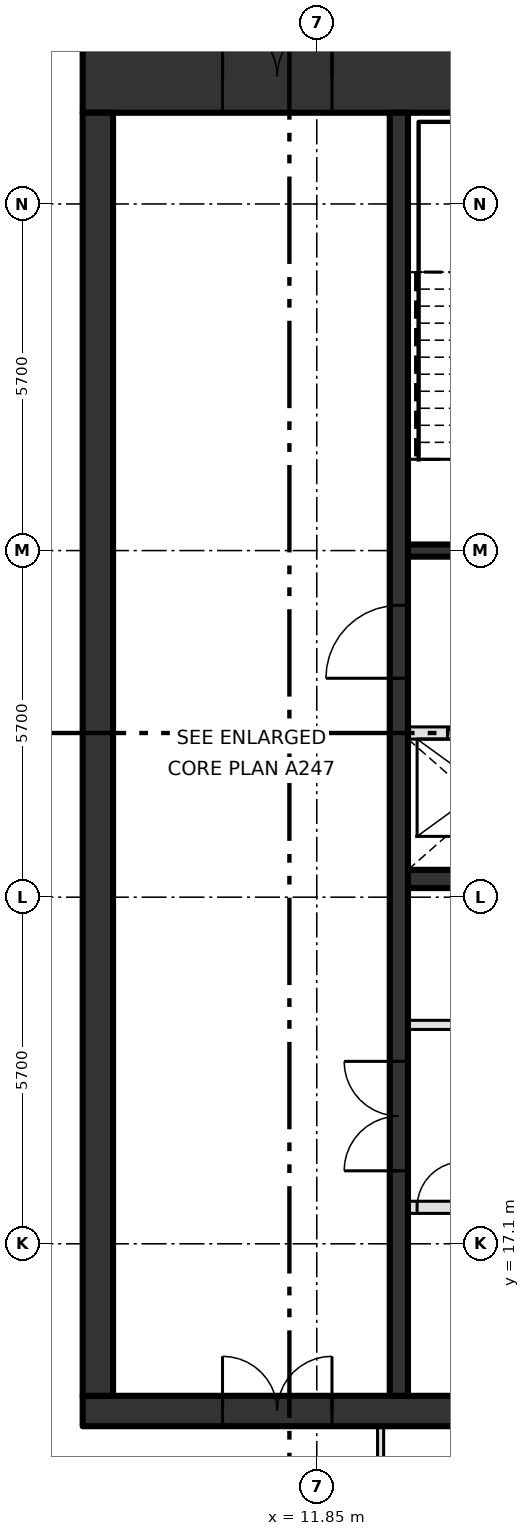
"""IFC4 building model, lengths in metres.
Left out: names, types, materials, properties, quantities, classifications, styles, units other than length and angle.
Written with IfcOpenShell. Run it as: python <this file> out.ifc"""

import sys

from ifc_helpers import new_model, si_unit, direction, frame, frame_2d, origin, place, context, subcontext, project, spatial, rectangle, extrude, element, fill, save


model = new_model("IFC4")
c1 = context("Model", 3, precision=1e-05, world=origin(), true_north=direction((0.0, 1.0)))
c2 = subcontext(c1, "Body", "Model", "MODEL_VIEW")
j1 = project(units=[si_unit("LENGTHUNIT", "METRE"), si_unit("PLANEANGLEUNIT", "RADIAN")], contexts=[c1])
p1 = place(None, origin())
s1 = spatial("IfcSite", under=j1, at=p1, CompositionType="ELEMENT")
p2 = place(p1, origin())
s2 = spatial("IfcBuilding", under=s1, at=p2, CompositionType="ELEMENT")
p3 = place(p2, frame((0.0, 0.0, 354.0)))
s3 = spatial("IfcBuildingStorey", under=s2, at=p3, CompositionType="ELEMENT", Elevation=354.0)
p4 = place(p3, frame((8.0, 14.35, -0.3), z_axis=(0.0, 0.0, 1.0), x_axis=(1.0, 0.0, 0.0)))
e1 = element("IfcWall", 1, at=p4, inside=s3, PredefinedType="SHEAR", context=c2, shape_type="SweptSolid", body=[
    extrude(rectangle(XDim=22.8, YDim=0.5, at=frame_2d((11.4, 0.0))), origin(), (0.0, 0.0, 1.0), 4.2),
])
p5 = place(p4, frame((2.3, 0.0, 0.3)))
e2 = element("IfcOpeningElement", 2, at=p5, cuts=e1, PredefinedType="OPENING", context=c2, shape_type="SweptSolid", body=[
    extrude(rectangle(XDim=1.8, YDim=2.1, at=frame_2d((0.9, 1.05))), frame((0.0, 0.26, 0.0), z_axis=(0.0, -1.0, 0.0), x_axis=(1.0, 0.0, 0.0)), (0.0, 0.0, 1.0), 0.52),
])
p6 = place(p3, frame((8.0, 36.3, -0.3), z_axis=(0.0, 0.0, 1.0), x_axis=(1.0, 0.0, 0.0)))
e3 = element("IfcWall", 3, at=p6, inside=s3, PredefinedType="SHEAR", context=c2, shape_type="SweptSolid", body=[
    extrude(rectangle(XDim=22.8, YDim=1.2, at=frame_2d((11.4, 0.0))), origin(), (0.0, 0.0, 1.0), 4.2),
])
p7 = place(p6, frame((2.3, 0.0, 0.3)))
e4 = element("IfcOpeningElement", 4, at=p7, cuts=e3, PredefinedType="OPENING", context=c2, shape_type="SweptSolid", body=[
    extrude(rectangle(XDim=1.8, YDim=2.1, at=frame_2d((0.9, 1.05))), frame((0.0, 0.61, 0.0), z_axis=(0.0, -1.0, 0.0), x_axis=(1.0, 0.0, 0.0)), (0.0, 0.0, 1.0), 1.22),
])
p8 = place(p3, frame((8.25, 14.6, -0.3), z_axis=(0.0, 0.0, 1.0), x_axis=(0.0, 1.0, 0.0)))
e5 = element("IfcWall", 5, at=p8, inside=s3, PredefinedType="SHEAR", context=c2, shape_type="SweptSolid", body=[
    extrude(rectangle(XDim=21.1, YDim=0.5, at=frame_2d((10.55, 0.0))), origin(), (0.0, 0.0, 1.0), 4.2),
])
p9 = place(p3, frame((13.35, 17.7, 0.0), z_axis=(0.0, 0.0, 1.0), x_axis=(1.0, 0.0, 0.0)))
e6 = element("IfcWall", 6, at=p9, inside=s3, PredefinedType="SOLIDWALL", context=c2, shape_type="SweptSolid", body=[
    extrude(rectangle(XDim=13.425, YDim=0.2, at=frame_2d((6.712, 0.0))), origin(), (0.0, 0.0, 1.0), 3.9),
])
p10 = place(p9, frame((2.0, 0.0, 0.0)))
e7 = element("IfcOpeningElement", 7, at=p10, cuts=e6, PredefinedType="OPENING", context=c2, shape_type="SweptSolid", body=[
    extrude(rectangle(XDim=1.1, YDim=2.1, at=frame_2d((0.55, 1.05))), frame((0.0, 0.11, 0.0), z_axis=(0.0, -1.0, 0.0), x_axis=(1.0, 0.0, 0.0)), (0.0, 0.0, 1.0), 0.22),
])
p11 = place(p9, frame((4.7, 0.0, 0.0)))
e8 = element("IfcOpeningElement", 8, at=p11, cuts=e6, PredefinedType="OPENING", context=c2, shape_type="SweptSolid", body=[
    extrude(rectangle(XDim=1.1, YDim=2.1, at=frame_2d((0.55, 1.05))), frame((0.0, 0.11, 0.0), z_axis=(0.0, -1.0, 0.0), x_axis=(1.0, 0.0, 0.0)), (0.0, 0.0, 1.0), 0.22),
])
p12 = place(p9, frame((7.4, 0.0, 0.0)))
e9 = element("IfcOpeningElement", 9, at=p12, cuts=e6, PredefinedType="OPENING", context=c2, shape_type="SweptSolid", body=[
    extrude(rectangle(XDim=1.1, YDim=2.1, at=frame_2d((0.55, 1.05))), frame((0.0, 0.11, 0.0), z_axis=(0.0, -1.0, 0.0), x_axis=(1.0, 0.0, 0.0)), (0.0, 0.0, 1.0), 0.22),
])
p13 = place(p9, frame((10.1, 0.0, 0.0)))
e10 = element("IfcOpeningElement", 10, at=p13, cuts=e6, PredefinedType="OPENING", context=c2, shape_type="SweptSolid", body=[
    extrude(rectangle(XDim=1.1, YDim=2.1, at=frame_2d((0.55, 1.05))), frame((0.0, 0.11, 0.0), z_axis=(0.0, -1.0, 0.0), x_axis=(1.0, 0.0, 0.0)), (0.0, 0.0, 1.0), 0.22),
])
p14 = place(p9, frame((0.15, 0.0, 0.0)))
e11 = element("IfcOpeningElement", 11, at=p14, cuts=e6, PredefinedType="OPENING", context=c2, shape_type="SweptSolid", body=[
    extrude(rectangle(XDim=0.75, YDim=2.1, at=frame_2d((0.375, 1.05))), frame((0.0, 0.11, 0.0), z_axis=(0.0, -1.0, 0.0), x_axis=(1.0, 0.0, 0.0)), (0.0, 0.0, 1.0), 0.22),
])
p15 = place(p9, frame((12.3, 0.0, 0.0)))
e12 = element("IfcOpeningElement", 12, at=p15, cuts=e6, PredefinedType="OPENING", context=c2, shape_type="SweptSolid", body=[
    extrude(rectangle(XDim=0.75, YDim=2.1, at=frame_2d((0.375, 1.05))), frame((0.0, 0.11, 0.0), z_axis=(0.0, -1.0, 0.0), x_axis=(1.0, 0.0, 0.0)), (0.0, 0.0, 1.0), 0.22),
])
p16 = place(p3, frame((13.35, 20.7, 0.0), z_axis=(0.0, 0.0, 1.0), x_axis=(1.0, 0.0, 0.0)))
e13 = element("IfcWall", 13, at=p16, inside=s3, PredefinedType="PARTITIONING", context=c2, shape_type="SweptSolid", body=[
    extrude(rectangle(XDim=13.425, YDim=0.15, at=frame_2d((6.712, 0.0))), origin(), (0.0, 0.0, 1.0), 3.9),
])
p17 = place(p16, frame((0.75, 0.0, 0.0)))
e14 = element("IfcOpeningElement", 14, at=p17, cuts=e13, PredefinedType="OPENING", context=c2, shape_type="SweptSolid", body=[
    extrude(rectangle(XDim=0.9, YDim=2.1, at=frame_2d((0.45, 1.05))), frame((0.0, 0.085, 0.0), z_axis=(0.0, -1.0, 0.0), x_axis=(1.0, 0.0, 0.0)), (0.0, 0.0, 1.0), 0.17),
])
p18 = place(p16, frame((7.5, 0.0, 0.0)))
e15 = element("IfcOpeningElement", 15, at=p18, cuts=e13, PredefinedType="OPENING", context=c2, shape_type="SweptSolid", body=[
    extrude(rectangle(XDim=0.9, YDim=2.1, at=frame_2d((0.45, 1.05))), frame((0.0, 0.085, 0.0), z_axis=(0.0, -1.0, 0.0), x_axis=(1.0, 0.0, 0.0)), (0.0, 0.0, 1.0), 0.17),
])
p19 = place(p3, frame((13.35, 23.1, 0.0), z_axis=(0.0, 0.0, 1.0), x_axis=(1.0, 0.0, 0.0)))
e16 = element("IfcWall", 16, at=p19, inside=s3, PredefinedType="SHEAR", context=c2, shape_type="SweptSolid", body=[
    extrude(rectangle(XDim=16.95, YDim=0.3, at=frame_2d((8.475, 0.0))), origin(), (0.0, 0.0, 1.0), 3.9),
])
p20 = place(p3, frame((13.35, 25.5, 0.0), z_axis=(0.0, 0.0, 1.0), x_axis=(1.0, 0.0, 0.0)))
e17 = element("IfcWall", 17, at=p20, inside=s3, PredefinedType="SOLIDWALL", context=c2, shape_type="SweptSolid", body=[
    extrude(rectangle(XDim=16.95, YDim=0.2, at=frame_2d((8.475, 0.0))), origin(), (0.0, 0.0, 1.0), 3.9),
])
p21 = place(p20, frame((0.65, 0.0, 0.0)))
e18 = element("IfcOpeningElement", 18, at=p21, cuts=e17, PredefinedType="OPENING", context=c2, shape_type="SweptSolid", body=[
    extrude(rectangle(XDim=1.1, YDim=2.1, at=frame_2d((0.55, 1.05))), frame((0.0, 0.11, 0.0), z_axis=(0.0, -1.0, 0.0), x_axis=(1.0, 0.0, 0.0)), (0.0, 0.0, 1.0), 0.22),
])
p22 = place(p20, frame((3.35, 0.0, 0.0)))
e19 = element("IfcOpeningElement", 19, at=p22, cuts=e17, PredefinedType="OPENING", context=c2, shape_type="SweptSolid", body=[
    extrude(rectangle(XDim=1.1, YDim=2.1, at=frame_2d((0.55, 1.05))), frame((0.0, 0.11, 0.0), z_axis=(0.0, -1.0, 0.0), x_axis=(1.0, 0.0, 0.0)), (0.0, 0.0, 1.0), 0.22),
])
p23 = place(p20, frame((6.05, 0.0, 0.0)))
e20 = element("IfcOpeningElement", 20, at=p23, cuts=e17, PredefinedType="OPENING", context=c2, shape_type="SweptSolid", body=[
    extrude(rectangle(XDim=1.1, YDim=2.1, at=frame_2d((0.55, 1.05))), frame((0.0, 0.11, 0.0), z_axis=(0.0, -1.0, 0.0), x_axis=(1.0, 0.0, 0.0)), (0.0, 0.0, 1.0), 0.22),
])
p24 = place(p20, frame((8.75, 0.0, 0.0)))
e21 = element("IfcOpeningElement", 21, at=p24, cuts=e17, PredefinedType="OPENING", context=c2, shape_type="SweptSolid", body=[
    extrude(rectangle(XDim=1.1, YDim=2.1, at=frame_2d((0.55, 1.05))), frame((0.0, 0.11, 0.0), z_axis=(0.0, -1.0, 0.0), x_axis=(1.0, 0.0, 0.0)), (0.0, 0.0, 1.0), 0.22),
])
p25 = place(p20, frame((13.0, 0.0, 0.0)))
e22 = element("IfcOpeningElement", 22, at=p25, cuts=e17, PredefinedType="OPENING", context=c2, shape_type="SweptSolid", body=[
    extrude(rectangle(XDim=0.9, YDim=2.1, at=frame_2d((0.45, 1.05))), frame((0.0, 0.11, 0.0), z_axis=(0.0, -1.0, 0.0), x_axis=(1.0, 0.0, 0.0)), (0.0, 0.0, 1.0), 0.22),
])
p26 = place(p3, frame((13.35, 28.5, 0.0), z_axis=(0.0, 0.0, 1.0), x_axis=(1.0, 0.0, 0.0)))
e23 = element("IfcWall", 23, at=p26, inside=s3, PredefinedType="SOLIDWALL", context=c2, shape_type="SweptSolid", body=[
    extrude(rectangle(XDim=6.75, YDim=0.2, at=frame_2d((3.375, 0.0))), origin(), (0.0, 0.0, 1.0), 3.9),
])
p27 = place(p26, frame((0.95, 0.0, 0.0)))
e24 = element("IfcOpeningElement", 24, at=p27, cuts=e23, PredefinedType="OPENING", context=c2, shape_type="SweptSolid", body=[
    extrude(rectangle(XDim=1.2, YDim=2.1, at=frame_2d((0.6, 1.05))), frame((0.0, 0.11, 0.0), z_axis=(0.0, -1.0, 0.0), x_axis=(1.0, 0.0, 0.0)), (0.0, 0.0, 1.0), 0.22),
])
p28 = place(p26, frame((3.75, 0.0, 0.0)))
e25 = element("IfcOpeningElement", 25, at=p28, cuts=e23, PredefinedType="OPENING", context=c2, shape_type="SweptSolid", body=[
    extrude(rectangle(XDim=1.1, YDim=2.1, at=frame_2d((0.55, 1.05))), frame((0.0, 0.11, 0.0), z_axis=(0.0, -1.0, 0.0), x_axis=(1.0, 0.0, 0.0)), (0.0, 0.0, 1.0), 0.22),
])
p29 = place(p3, frame((13.2, 14.6, 0.0), z_axis=(0.0, 0.0, 1.0), x_axis=(0.0, 1.0, 0.0)))
e26 = element("IfcWall", 26, at=p29, inside=s3, PredefinedType="SHEAR", context=c2, shape_type="SweptSolid", body=[
    extrude(rectangle(XDim=21.1, YDim=0.3, at=frame_2d((10.55, 0.0))), origin(), (0.0, 0.0, 1.0), 3.9),
])
p30 = place(p29, frame((3.7, 0.0, 0.0)))
e27 = element("IfcOpeningElement", 27, at=p30, cuts=e26, PredefinedType="OPENING", context=c2, shape_type="SweptSolid", body=[
    extrude(rectangle(XDim=1.8, YDim=2.1, at=frame_2d((0.9, 1.05))), frame((0.0, 0.16, 0.0), z_axis=(0.0, -1.0, 0.0), x_axis=(1.0, 0.0, 0.0)), (0.0, 0.0, 1.0), 0.32),
])
p31 = place(p29, frame((11.8, 0.0, 0.0)))
e28 = element("IfcOpeningElement", 28, at=p31, cuts=e26, PredefinedType="OPENING", context=c2, shape_type="SweptSolid", body=[
    extrude(rectangle(XDim=1.2, YDim=2.1, at=frame_2d((0.6, 1.05))), frame((0.0, 0.16, 0.0), z_axis=(0.0, -1.0, 0.0), x_axis=(1.0, 0.0, 0.0)), (0.0, 0.0, 1.0), 0.32),
])
p32 = place(p3, frame((12.9, 10.078, 0.0), z_axis=(0.0, 0.0, 1.0), x_axis=(0.0, 1.0, 0.0)))
e29 = element("IfcWall", 29, at=p32, inside=s3, PredefinedType="PARTITIONING", context=c2, shape_type="SweptSolid", body=[
    extrude(rectangle(XDim=4.022, YDim=0.1, at=frame_2d((2.011, 0.0))), origin(), (0.0, 0.0, 1.0), 3.9),
])
p33 = place(p21, origin())
e30 = element("IfcDoor", 30, at=p33, inside=s3, OperationType="SLIDING_TO_LEFT", PredefinedType="DOOR", context=c2, shape_type="SweptSolid", body=[
    extrude(rectangle(XDim=1.1, YDim=2.1, at=frame_2d((0.55, 1.05))), frame((0.0, 0.025, 0.0), z_axis=(0.0, -1.0, 0.0), x_axis=(1.0, 0.0, 0.0)), (0.0, 0.0, 1.0), 0.05),
])
fill(e18, e30)
p34 = place(p14, origin())
e31 = element("IfcDoor", 31, at=p34, inside=s3, OperationType="SINGLE_SWING_RIGHT", PredefinedType="DOOR", context=c2, shape_type="SweptSolid", body=[
    extrude(rectangle(XDim=0.75, YDim=2.1, at=frame_2d((0.375, 1.05))), frame((0.0, 0.025, 0.0), z_axis=(0.0, -1.0, 0.0), x_axis=(1.0, 0.0, 0.0)), (0.0, 0.0, 1.0), 0.05),
])
fill(e11, e31)
p35 = place(p30, origin())
e32 = element("IfcDoor", 32, at=p35, inside=s3, OperationType="DOUBLE_DOOR_SINGLE_SWING", PredefinedType="DOOR", context=c2, shape_type="SweptSolid", body=[
    extrude(rectangle(XDim=1.8, YDim=2.1, at=frame_2d((0.9, 1.05))), frame((0.0, 0.025, 0.0), z_axis=(0.0, -1.0, 0.0), x_axis=(1.0, 0.0, 0.0)), (0.0, 0.0, 1.0), 0.05),
])
fill(e27, e32)
p36 = place(p31, origin())
e33 = element("IfcDoor", 33, at=p36, inside=s3, OperationType="SINGLE_SWING_LEFT", PredefinedType="DOOR", context=c2, shape_type="SweptSolid", body=[
    extrude(rectangle(XDim=1.2, YDim=2.1, at=frame_2d((0.6, 1.05))), frame((0.0, 0.025, 0.0), z_axis=(0.0, -1.0, 0.0), x_axis=(1.0, 0.0, 0.0)), (0.0, 0.0, 1.0), 0.05),
])
fill(e28, e33)
p37 = place(p7, origin())
e34 = element("IfcDoor", 34, at=p37, inside=s3, OperationType="DOUBLE_DOOR_SINGLE_SWING", PredefinedType="DOOR", context=c2, shape_type="SweptSolid", body=[
    extrude(rectangle(XDim=1.8, YDim=2.1, at=frame_2d((0.9, 1.05))), frame((0.0, 0.025, 0.0), z_axis=(0.0, -1.0, 0.0), x_axis=(1.0, 0.0, 0.0)), (0.0, 0.0, 1.0), 0.05),
])
fill(e4, e34)
p38 = place(p5, origin())
e35 = element("IfcDoor", 35, at=p38, inside=s3, OperationType="DOUBLE_DOOR_SINGLE_SWING", PredefinedType="DOOR", context=c2, shape_type="SweptSolid", body=[
    extrude(rectangle(XDim=1.8, YDim=2.1, at=frame_2d((0.9, 1.05))), frame((0.0, 0.025, 0.0), z_axis=(0.0, -1.0, 0.0), x_axis=(1.0, 0.0, 0.0)), (0.0, 0.0, 1.0), 0.05),
])
fill(e2, e35)
save(model, sys.argv[1])
